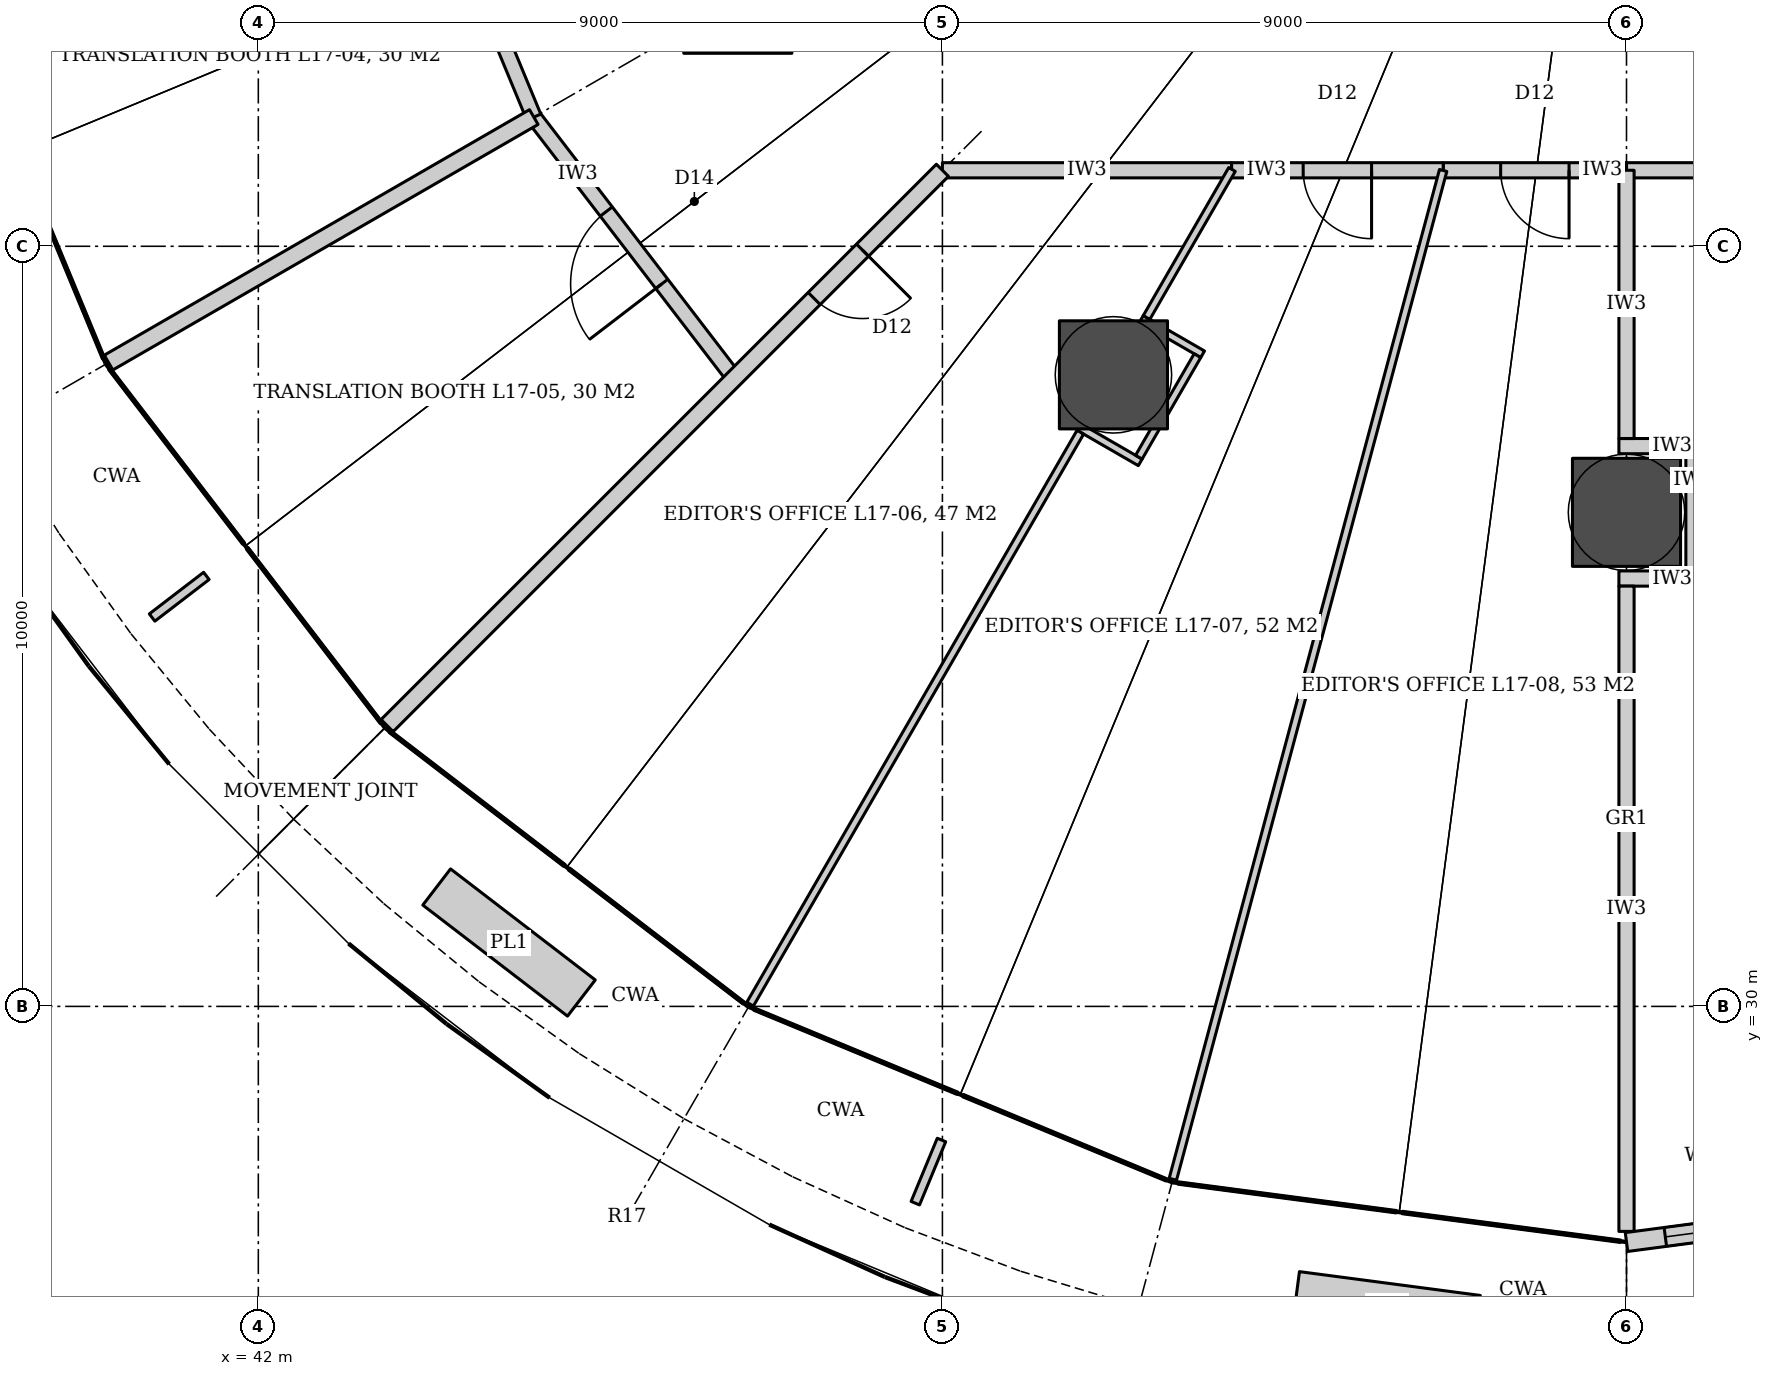
"""IFC4 building model, lengths in metres.
Left out: names, types, materials, properties, quantities, classifications, styles, units other than length and angle.
Written with IfcOpenShell. Run it as: python <this file> out.ifc"""

import sys

from ifc_helpers import new_model, si_unit, direction, frame, frame_2d, origin, origin_2d, place, context, subcontext, project, spatial, rectangle, hollow_circle, extrude, element, fill, save


model = new_model("IFC4")
c1 = context("Model", 3, precision=1e-05, world=origin(), true_north=direction((0.0, 1.0)))
c2 = subcontext(c1, "Body", "Model", "MODEL_VIEW")
j1 = project(units=[si_unit("LENGTHUNIT", "METRE"), si_unit("PLANEANGLEUNIT", "RADIAN")], contexts=[c1])
p1 = place(None, origin())
s1 = spatial("IfcSite", under=j1, at=p1, CompositionType="ELEMENT")
p2 = place(p1, origin())
s2 = spatial("IfcBuilding", under=s1, at=p2, CompositionType="ELEMENT")
p3 = place(p2, frame((0.0, 0.0, 80.6)))
s3 = spatial("IfcBuildingStorey", under=s2, at=p3, CompositionType="ELEMENT", Elevation=80.6)
for number, where, z_axis, x_axis in (
    (1, (48.309, 43.25, 0.0), (0.0, 0.0, 1.0), (1.0, 0.0, 0.0)),
    (2, (53.25, 38.309, 0.0), (0.0, 0.0, 1.0), (1.0, 0.0, 0.0)),
    (3, (60.0, 36.5, 0.0), (0.0, 0.0, 1.0), (1.0, 0.0, 0.0)),
):
    element("IfcColumn", number, at=place(p3, frame(where, z_axis=z_axis, x_axis=x_axis)), inside=s3, PredefinedType="COLUMN", context=c2, shape_type="SweptSolid", body=[
        extrude(hollow_circle(Radius=0.711, WallThickness=0.07, at=origin_2d()), origin(), (0.0, 0.0, 1.0), 4.2),
    ])
p4 = place(p3, frame((48.262, 38.262, 0.0), z_axis=(0.0, 0.0, 1.0), x_axis=(-0.60874374674, 0.79336690806, 0.0)))
e4 = element("IfcWall", 4, at=p4, inside=s3, PredefinedType="PARTITIONING", context=c2, shape_type="SweptSolid", body=[
    extrude(rectangle(XDim=4.333, YDim=0.2, at=frame_2d((2.167, 0.0))), origin(), (0.0, 0.0, 1.0), 3.04),
])
p5 = place(p4, frame((1.567, 0.0, 0.0)))
e5 = element("IfcOpeningElement", 5, at=p5, cuts=e4, PredefinedType="OPENING", context=c2, shape_type="SweptSolid", body=[
    extrude(rectangle(XDim=1.2, YDim=2.4, at=frame_2d((0.6, 1.2))), frame((0.0, 0.11, 0.0), z_axis=(0.0, -1.0, 0.0), x_axis=(1.0, 0.0, 0.0)), (0.0, 0.0, 1.0), 0.22),
])
p6 = place(p3, frame((45.624, 41.7, 0.0), z_axis=(0.0, 0.0, 1.0), x_axis=(-0.382698425325, 0.923873322082, 0.0)))
e6 = element("IfcWall", 6, at=p6, inside=s3, PredefinedType="PARTITIONING", context=c2, shape_type="SweptSolid", body=[
    extrude(rectangle(XDim=4.333, YDim=0.2, at=frame_2d((2.167, 0.0))), origin(), (0.0, 0.0, 1.0), 3.04),
])
p7 = place(p6, frame((1.567, 0.0, 0.0)))
e7 = element("IfcOpeningElement", 7, at=p7, cuts=e6, PredefinedType="OPENING", context=c2, shape_type="SweptSolid", body=[
    extrude(rectangle(XDim=1.2, YDim=2.4, at=frame_2d((0.6, 1.2))), frame((0.0, 0.11, 0.0), z_axis=(0.0, -1.0, 0.0), x_axis=(1.0, 0.0, 0.0)), (0.0, 0.0, 1.0), 0.22),
])
p8 = place(p3, frame((65.196, 41.0, 0.0), z_axis=(0.0, 0.0, 1.0), x_axis=(-1.0, 0.0, 0.0)))
e8 = element("IfcWall", 8, at=p8, inside=s3, PredefinedType="PARTITIONING", context=c2, shape_type="SweptSolid", body=[
    extrude(rectangle(XDim=5.196, YDim=0.2, at=frame_2d((2.598, 0.0))), origin(), (0.0, 0.0, 1.0), 3.04),
])
p9 = place(p8, frame((2.098, 0.0, 0.0)))
e9 = element("IfcOpeningElement", 9, at=p9, cuts=e8, PredefinedType="OPENING", context=c2, shape_type="SweptSolid", body=[
    extrude(rectangle(XDim=1.0, YDim=2.1, at=frame_2d((0.5, 1.05))), frame((0.0, 0.11, 0.0), z_axis=(0.0, -1.0, 0.0), x_axis=(1.0, 0.0, 0.0)), (0.0, 0.0, 1.0), 0.22),
])
p10 = place(p3, frame((60.0, 41.0, 0.0), z_axis=(0.0, 0.0, 1.0), x_axis=(-1.0, 0.0, 0.0)))
e10 = element("IfcWall", 10, at=p10, inside=s3, PredefinedType="PARTITIONING", context=c2, shape_type="SweptSolid", body=[
    extrude(rectangle(XDim=2.412, YDim=0.2, at=frame_2d((1.206, 0.0))), origin(), (0.0, 0.0, 1.0), 3.04),
])
p11 = place(p10, frame((0.756, 0.0, 0.0)))
e11 = element("IfcOpeningElement", 11, at=p11, cuts=e10, PredefinedType="OPENING", context=c2, shape_type="SweptSolid", body=[
    extrude(rectangle(XDim=0.9, YDim=2.4, at=frame_2d((0.45, 1.2))), frame((0.0, 0.11, 0.0), z_axis=(0.0, -1.0, 0.0), x_axis=(1.0, 0.0, 0.0)), (0.0, 0.0, 1.0), 0.22),
])
p12 = place(p3, frame((57.588, 41.0, 0.0), z_axis=(0.0, 0.0, 1.0), x_axis=(-1.0, 0.0, 0.0)))
e12 = element("IfcWall", 12, at=p12, inside=s3, PredefinedType="PARTITIONING", context=c2, shape_type="SweptSolid", body=[
    extrude(rectangle(XDim=2.785, YDim=0.2, at=frame_2d((1.392, 0.0))), origin(), (0.0, 0.0, 1.0), 3.04),
])
p13 = place(p12, frame((0.942, 0.0, 0.0)))
e13 = element("IfcOpeningElement", 13, at=p13, cuts=e12, PredefinedType="OPENING", context=c2, shape_type="SweptSolid", body=[
    extrude(rectangle(XDim=0.9, YDim=2.4, at=frame_2d((0.45, 1.2))), frame((0.0, 0.11, 0.0), z_axis=(0.0, -1.0, 0.0), x_axis=(1.0, 0.0, 0.0)), (0.0, 0.0, 1.0), 0.22),
])
p14 = place(p3, frame((54.804, 41.0, 0.0), z_axis=(0.0, 0.0, 1.0), x_axis=(-1.0, 0.0, 0.0)))
e14 = element("IfcWall", 14, at=p14, inside=s3, PredefinedType="PARTITIONING", context=c2, shape_type="SweptSolid", body=[
    extrude(rectangle(XDim=3.804, YDim=0.2, at=frame_2d((1.902, 0.0))), origin(), (0.0, 0.0, 1.0), 3.02),
])
p15 = place(p3, frame((45.624, 41.7, 0.0), z_axis=(0.0, 0.0, 1.0), x_axis=(-0.866025099701, -0.500000526688, 0.0)))
e15 = element("IfcWall", 15, at=p15, inside=s3, PredefinedType="PARTITIONING", context=c2, shape_type="SweptSolid", body=[
    extrude(rectangle(XDim=6.46, YDim=0.225, at=frame_2d((3.23, 0.0))), origin(), (0.0, 0.0, 1.0), 3.04),
])
p16 = place(p3, frame((51.0, 41.0, 0.0), z_axis=(0.0, 0.0, 1.0), x_axis=(-0.707106781187, -0.707106781187, 0.0)))
e16 = element("IfcWall", 16, at=p16, inside=s3, PredefinedType="PARTITIONING", context=c2, shape_type="SweptSolid", body=[
    extrude(rectangle(XDim=10.332, YDim=0.225, at=frame_2d((5.166, 0.0))), origin(), (0.0, 0.0, 1.0), 3.02),
])
p17 = place(p16, frame((1.486, 0.0, 0.0)))
e17 = element("IfcOpeningElement", 17, at=p17, cuts=e16, PredefinedType="OPENING", context=c2, shape_type="SweptSolid", body=[
    extrude(rectangle(XDim=0.9, YDim=2.4, at=frame_2d((0.45, 1.2))), frame((0.0, 0.123, 0.0), z_axis=(0.0, -1.0, 0.0), x_axis=(1.0, 0.0, 0.0)), (0.0, 0.0, 1.0), 0.245),
])
for number, where, z_axis, x_axis in (
    (18, (53.617, 39.045, 0.0), (0.0, 0.0, 1.0), (0.866, -0.5, 0.0)),
    (19, (52.796, 37.623, 0.0), (0.0, 0.0, 1.0), (0.866, -0.5, 0.0)),
):
    element("IfcWall", number, at=place(p3, frame(where, z_axis=z_axis, x_axis=x_axis)), inside=s3, PredefinedType="PARTITIONING", context=c2, shape_type="SweptSolid", body=[
        extrude(rectangle(XDim=0.931, YDim=0.1, at=frame_2d((0.466, 0.0))), origin(), (0.0, 0.0, 1.0), 3.02),
    ])
p18 = place(p3, frame((54.355, 38.561, 0.0), z_axis=(0.0, 0.0, 1.0), x_axis=(-0.50005597947, -0.86599308161, 0.0)))
e20 = element("IfcWall", 20, at=p18, inside=s3, PredefinedType="PARTITIONING", context=c2, shape_type="SweptSolid", body=[
    extrude(rectangle(XDim=1.542, YDim=0.1, at=frame_2d((0.771, 0.0))), origin(), (0.0, 0.0, 1.0), 3.02),
])
p19 = place(p3, frame((54.81, 41.011, 0.0), z_axis=(0.0, 0.0, 1.0), x_axis=(-0.499991822116, -0.866030125237, 0.0)))
e21 = element("IfcWall", 21, at=p19, inside=s3, PredefinedType="PARTITIONING", context=c2, shape_type="SweptSolid", body=[
    extrude(rectangle(XDim=2.249, YDim=0.1, at=frame_2d((1.125, 0.0))), origin(), (0.0, 0.0, 1.0), 3.04),
])
p20 = place(p3, frame((52.814, 37.554, 0.0), z_axis=(0.0, 0.0, 1.0), x_axis=(-0.500010270335, -0.866019474122, 0.0)))
e22 = element("IfcWall", 22, at=p20, inside=s3, PredefinedType="PARTITIONING", context=c2, shape_type="SweptSolid", body=[
    extrude(rectangle(XDim=8.689, YDim=0.1, at=frame_2d((4.344, 0.0))), origin(), (0.0, 0.0, 1.0), 3.04),
])
p21 = place(p3, frame((57.588, 40.998, 0.0), z_axis=(0.0, 0.0, 1.0), x_axis=(-0.258835854707, -0.965921322012, 0.0)))
e23 = element("IfcWall", 23, at=p21, inside=s3, PredefinedType="PARTITIONING", context=c2, shape_type="SweptSolid", body=[
    extrude(rectangle(XDim=13.74, YDim=0.1, at=frame_2d((6.87, 0.0))), origin(), (0.0, 0.0, 1.0), 3.02),
])
for number, where, z_axis, x_axis in (
    (24, (59.9, 37.371, 0.0), (0.0, 0.0, 1.0), (1.0, 0.0, 0.0)),
    (25, (59.9, 35.629, 0.0), (0.0, 0.0, 1.0), (1.0, 0.0, 0.0)),
):
    element("IfcWall", number, at=place(p3, frame(where, z_axis=z_axis, x_axis=x_axis)), inside=s3, PredefinedType="PARTITIONING", context=c2, shape_type="SweptSolid", body=[
        extrude(rectangle(XDim=1.081, YDim=0.2, at=frame_2d((0.541, 0.0))), origin(), (0.0, 0.0, 1.0), 3.02),
    ])
p22 = place(p3, frame((60.881, 37.271, 0.0), z_axis=(0.0, 0.0, 1.0), x_axis=(0.0, -1.0, 0.0)))
e26 = element("IfcWall", 26, at=p22, inside=s3, PredefinedType="PARTITIONING", context=c2, shape_type="SweptSolid", body=[
    extrude(rectangle(XDim=1.542, YDim=0.2, at=frame_2d((0.771, 0.0))), origin(), (0.0, 0.0, 1.0), 3.02),
])
p23 = place(p3, frame((60.0, 41.0, 0.0), z_axis=(0.0, 0.0, 1.0), x_axis=(0.0, -1.0, 0.0)))
e27 = element("IfcWall", 27, at=p23, inside=s3, PredefinedType="PARTITIONING", context=c2, shape_type="SweptSolid", body=[
    extrude(rectangle(XDim=3.529, YDim=0.2, at=frame_2d((1.765, 0.0))), origin(), (0.0, 0.0, 1.0), 3.04),
])
p24 = place(p3, frame((60.0, 35.529, 0.0), z_axis=(0.0, 0.0, 1.0), x_axis=(0.0, -1.0, 0.0)))
e28 = element("IfcWall", 28, at=p24, inside=s3, PredefinedType="PARTITIONING", context=c2, shape_type="SweptSolid", body=[
    extrude(rectangle(XDim=8.489, YDim=0.2, at=frame_2d((4.245, 0.0))), origin(), (0.0, 0.0, 1.0), 3.04),
])
p25 = place(p3, frame((60.0, 26.9, 0.0), z_axis=(0.0, 0.0, 1.0), x_axis=(0.991445060532, 0.130524679454, 0.0)))
e29 = element("IfcWall", 29, at=p25, inside=s3, PredefinedType="SOLIDWALL", context=c2, shape_type="SweptSolid", body=[
    extrude(rectangle(XDim=6.03, YDim=0.25, at=frame_2d((3.015, 0.0))), origin(), (0.0, 0.0, 1.0), 4.04),
])
p26 = place(p25, frame((2.115, 0.0, 0.0)))
e30 = element("IfcOpeningElement", 30, at=p26, cuts=e29, PredefinedType="OPENING", context=c2, shape_type="SweptSolid", body=[
    extrude(rectangle(XDim=1.8, YDim=2.4, at=frame_2d((0.9, 1.2))), frame((0.0, 0.135, 0.0), z_axis=(0.0, -1.0, 0.0), x_axis=(1.0, 0.0, 0.0)), (0.0, 0.0, 1.0), 0.27),
])
p27 = place(p25, frame((0.515, 0.0, 0.0)))
e31 = element("IfcOpeningElement", 31, at=p27, cuts=e29, PredefinedType="OPENING", context=c2, shape_type="SweptSolid", body=[
    extrude(rectangle(XDim=1.2, YDim=2.4, at=frame_2d((0.6, 1.2))), frame((0.0, 0.135, 0.0), z_axis=(0.0, -1.0, 0.0), x_axis=(1.0, 0.0, 0.0)), (0.0, 0.0, 1.0), 0.27),
])
p28 = place(p25, frame((4.315, 0.0, 0.0)))
e32 = element("IfcOpeningElement", 32, at=p28, cuts=e29, PredefinedType="OPENING", context=c2, shape_type="SweptSolid", body=[
    extrude(rectangle(XDim=1.2, YDim=2.4, at=frame_2d((0.6, 1.2))), frame((0.0, 0.135, 0.0), z_axis=(0.0, -1.0, 0.0), x_axis=(1.0, 0.0, 0.0)), (0.0, 0.0, 1.0), 0.27),
])
p29 = place(p5, origin())
e33 = element("IfcDoor", 33, at=p29, inside=s3, OperationType="SINGLE_SWING_LEFT", PredefinedType="DOOR", context=c2, shape_type="SweptSolid", body=[
    extrude(rectangle(XDim=1.2, YDim=2.4, at=frame_2d((0.6, 1.2))), frame((0.0, 0.025, 0.0), z_axis=(0.0, -1.0, 0.0), x_axis=(1.0, 0.0, 0.0)), (0.0, 0.0, 1.0), 0.05),
])
fill(e5, e33)
p30 = place(p17, origin())
e34 = element("IfcDoor", 34, at=p30, inside=s3, OperationType="SINGLE_SWING_LEFT", PredefinedType="DOOR", context=c2, shape_type="SweptSolid", body=[
    extrude(rectangle(XDim=0.9, YDim=2.4, at=frame_2d((0.45, 1.2))), frame((0.0, 0.025, 0.0), z_axis=(0.0, -1.0, 0.0), x_axis=(1.0, 0.0, 0.0)), (0.0, 0.0, 1.0), 0.05),
])
fill(e17, e34)
p31 = place(p13, origin())
e35 = element("IfcDoor", 35, at=p31, inside=s3, OperationType="SINGLE_SWING_LEFT", PredefinedType="DOOR", context=c2, shape_type="SweptSolid", body=[
    extrude(rectangle(XDim=0.9, YDim=2.4, at=frame_2d((0.45, 1.2))), frame((0.0, 0.025, 0.0), z_axis=(0.0, -1.0, 0.0), x_axis=(1.0, 0.0, 0.0)), (0.0, 0.0, 1.0), 0.05),
])
fill(e13, e35)
p32 = place(p11, origin())
e36 = element("IfcDoor", 36, at=p32, inside=s3, OperationType="SINGLE_SWING_LEFT", PredefinedType="DOOR", context=c2, shape_type="SweptSolid", body=[
    extrude(rectangle(XDim=0.9, YDim=2.4, at=frame_2d((0.45, 1.2))), frame((0.0, 0.025, 0.0), z_axis=(0.0, -1.0, 0.0), x_axis=(1.0, 0.0, 0.0)), (0.0, 0.0, 1.0), 0.05),
])
fill(e11, e36)
p33 = place(p27, origin())
e37 = element("IfcWindow", 37, at=p33, inside=s3, PartitioningType="SINGLE_PANEL", PredefinedType="WINDOW", context=c2, shape_type="SweptSolid", body=[
    extrude(rectangle(XDim=1.2, YDim=2.4, at=frame_2d((0.6, 1.2))), frame((0.0, 0.03, 0.0), z_axis=(0.0, -1.0, 0.0), x_axis=(1.0, 0.0, 0.0)), (0.0, 0.0, 1.0), 0.06),
])
fill(e31, e37)
save(model, sys.argv[1])
